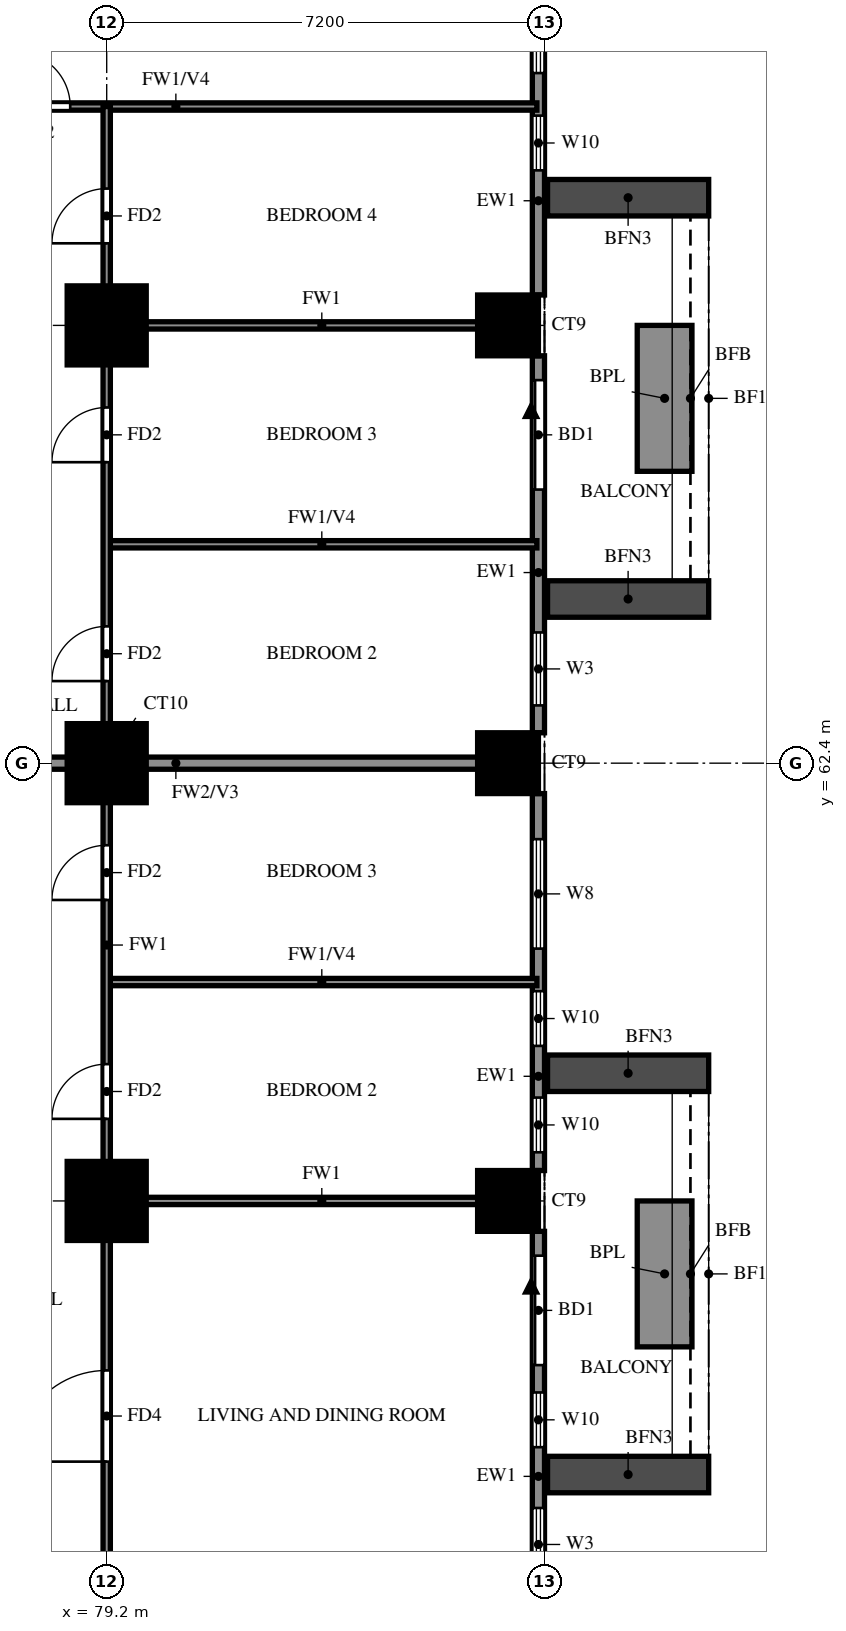
"""IFC4 building model, lengths in metres.
Left out: names, types, materials, properties, quantities, classifications, styles, units other than length and angle.
Written with IfcOpenShell. Run it as: python <this file> out.ifc"""

import sys

from ifc_helpers import new_model, si_unit, direction, frame, frame_2d, origin, origin_2d, place, context, subcontext, project, spatial, rectangle, extrude, source, transform, mapped, element, fill, save


model = new_model("IFC4")
c1 = context("Model", 3, precision=1e-05, world=origin(), true_north=direction((0.0, 1.0)))
c2 = subcontext(c1, "Body", "Model", "MODEL_VIEW")
j1 = project(units=[si_unit("LENGTHUNIT", "METRE"), si_unit("PLANEANGLEUNIT", "RADIAN")], contexts=[c1])
p1 = place(None, origin())
s1 = spatial("IfcSite", under=j1, at=p1, CompositionType="ELEMENT")
p2 = place(p1, origin())
s2 = spatial("IfcBuilding", under=s1, at=p2, CompositionType="ELEMENT")
p3 = place(p2, frame((0.0, 0.0, 72.5)))
s3 = spatial("IfcBuildingStorey", under=s2, at=p3, CompositionType="ELEMENT", Elevation=72.5)
m1 = source(origin(), c2, "Body", "SweptSolid", [
    extrude(rectangle(XDim=1.3, YDim=1.3, at=origin_2d()), origin(), (0.0, 0.0, 1.0), 3.18),
])
p4 = place(p3, frame((79.2, 55.2, 0.0), z_axis=(0.0, 0.0, 1.0), x_axis=(1.0, 0.0, 0.0)))
e1 = element("IfcColumn", 1, at=p4, inside=s3, PredefinedType="COLUMN", context=c2, shape_type="MappedRepresentation", body=[
    mapped(m1, transform((0.0, 0.0, 0.0))),
])
m2 = source(origin(), c2, "Body", "SweptSolid", [
    extrude(rectangle(XDim=1.0, YDim=1.0, at=origin_2d()), origin(), (0.0, 0.0, 1.0), 3.18),
])
p5 = place(p3, frame((85.8, 55.2, 0.0), z_axis=(0.0, 0.0, 1.0), x_axis=(1.0, 0.0, 0.0)))
e2 = element("IfcColumn", 2, at=p5, inside=s3, PredefinedType="COLUMN", context=c2, shape_type="MappedRepresentation", body=[
    mapped(m2, transform((0.0, 0.0, 0.0))),
])
p6 = place(p3, frame((79.2, 62.4, 0.0), z_axis=(0.0, 0.0, 1.0), x_axis=(1.0, 0.0, 0.0)))
e3 = element("IfcColumn", 3, at=p6, inside=s3, PredefinedType="COLUMN", context=c2, shape_type="MappedRepresentation", body=[
    mapped(m1, transform((0.0, 0.0, 0.0))),
])
p7 = place(p3, frame((85.8, 62.4, 0.0), z_axis=(0.0, 0.0, 1.0), x_axis=(1.0, 0.0, 0.0)))
e4 = element("IfcColumn", 4, at=p7, inside=s3, PredefinedType="COLUMN", context=c2, shape_type="MappedRepresentation", body=[
    mapped(m2, transform((0.0, 0.0, 0.0))),
])
p8 = place(p3, frame((79.2, 69.6, 0.0), z_axis=(0.0, 0.0, 1.0), x_axis=(1.0, 0.0, 0.0)))
e5 = element("IfcColumn", 5, at=p8, inside=s3, PredefinedType="COLUMN", context=c2, shape_type="MappedRepresentation", body=[
    mapped(m1, transform((0.0, 0.0, 0.0))),
])
p9 = place(p3, frame((85.8, 69.6, 0.0), z_axis=(0.0, 0.0, 1.0), x_axis=(1.0, 0.0, 0.0)))
e6 = element("IfcColumn", 6, at=p9, inside=s3, PredefinedType="COLUMN", context=c2, shape_type="MappedRepresentation", body=[
    mapped(m2, transform((0.0, 0.0, 0.0))),
])
p10 = place(p3, frame((86.3, 48.5, 0.0), z_axis=(0.0, 0.0, 1.0), x_axis=(0.0, 1.0, 0.0)))
e7 = element("IfcWall", 7, at=p10, inside=s3, PredefinedType="SOLIDWALL", context=c2, shape_type="SweptSolid", body=[
    extrude(rectangle(XDim=6.2, YDim=0.2, at=frame_2d((3.1, 0.0))), origin(), (0.0, 0.0, 1.0), 3.18),
])
p11 = place(p10, frame((4.0, 0.0, 0.0)))
e8 = element("IfcOpeningElement", 8, at=p11, cuts=e7, PredefinedType="OPENING", context=c2, shape_type="SweptSolid", body=[
    extrude(rectangle(XDim=1.8, YDim=2.4, at=frame_2d((0.9, 1.2))), frame((0.0, 0.11, 0.0), z_axis=(0.0, -1.0, 0.0), x_axis=(1.0, 0.0, 0.0)), (0.0, 0.0, 1.0), 0.22),
])
p12 = place(p10, frame((0.45, 0.0, 0.6)))
e9 = element("IfcOpeningElement", 9, at=p12, cuts=e7, PredefinedType="OPENING", context=c2, shape_type="SweptSolid", body=[
    extrude(rectangle(XDim=1.2, YDim=2.4, at=frame_2d((0.6, 1.2))), frame((0.0, 0.11, 0.0), z_axis=(0.0, -1.0, 0.0), x_axis=(1.0, 0.0, 0.0)), (0.0, 0.0, 1.0), 0.22),
])
p13 = place(p10, frame((2.65, 0.0, 0.6)))
e10 = element("IfcOpeningElement", 10, at=p13, cuts=e7, PredefinedType="OPENING", context=c2, shape_type="SweptSolid", body=[
    extrude(rectangle(XDim=0.9, YDim=2.4, at=frame_2d((0.45, 1.2))), frame((0.0, 0.11, 0.0), z_axis=(0.0, -1.0, 0.0), x_axis=(1.0, 0.0, 0.0)), (0.0, 0.0, 1.0), 0.22),
])
p14 = place(p3, frame((86.3, 55.7, 0.0), z_axis=(0.0, 0.0, 1.0), x_axis=(0.0, 1.0, 0.0)))
e11 = element("IfcWall", 11, at=p14, inside=s3, PredefinedType="SOLIDWALL", context=c2, shape_type="SweptSolid", body=[
    extrude(rectangle(XDim=6.2, YDim=0.2, at=frame_2d((3.1, 0.0))), origin(), (0.0, 0.0, 1.0), 3.18),
])
p15 = place(p14, frame((0.3, 0.0, 0.6)))
e12 = element("IfcOpeningElement", 12, at=p15, cuts=e11, PredefinedType="OPENING", context=c2, shape_type="SweptSolid", body=[
    extrude(rectangle(XDim=0.9, YDim=2.4, at=frame_2d((0.45, 1.2))), frame((0.0, 0.11, 0.0), z_axis=(0.0, -1.0, 0.0), x_axis=(1.0, 0.0, 0.0)), (0.0, 0.0, 1.0), 0.22),
])
p16 = place(p14, frame((2.05, 0.0, 0.6)))
e13 = element("IfcOpeningElement", 13, at=p16, cuts=e11, PredefinedType="OPENING", context=c2, shape_type="SweptSolid", body=[
    extrude(rectangle(XDim=0.9, YDim=2.4, at=frame_2d((0.45, 1.2))), frame((0.0, 0.11, 0.0), z_axis=(0.0, -1.0, 0.0), x_axis=(1.0, 0.0, 0.0)), (0.0, 0.0, 1.0), 0.22),
])
p17 = place(p14, frame((3.65, 0.0, 0.6)))
e14 = element("IfcOpeningElement", 14, at=p17, cuts=e11, PredefinedType="OPENING", context=c2, shape_type="SweptSolid", body=[
    extrude(rectangle(XDim=1.8, YDim=2.4, at=frame_2d((0.9, 1.2))), frame((0.0, 0.11, 0.0), z_axis=(0.0, -1.0, 0.0), x_axis=(1.0, 0.0, 0.0)), (0.0, 0.0, 1.0), 0.22),
])
p18 = place(p3, frame((86.3, 62.9, 0.0), z_axis=(0.0, 0.0, 1.0), x_axis=(0.0, 1.0, 0.0)))
e15 = element("IfcWall", 15, at=p18, inside=s3, PredefinedType="SOLIDWALL", context=c2, shape_type="SweptSolid", body=[
    extrude(rectangle(XDim=6.2, YDim=0.2, at=frame_2d((3.1, 0.0))), origin(), (0.0, 0.0, 1.0), 3.18),
])
p19 = place(p18, frame((4.0, 0.0, 0.0)))
e16 = element("IfcOpeningElement", 16, at=p19, cuts=e15, PredefinedType="OPENING", context=c2, shape_type="SweptSolid", body=[
    extrude(rectangle(XDim=1.8, YDim=2.4, at=frame_2d((0.9, 1.2))), frame((0.0, 0.11, 0.0), z_axis=(0.0, -1.0, 0.0), x_axis=(1.0, 0.0, 0.0)), (0.0, 0.0, 1.0), 0.22),
])
p20 = place(p18, frame((0.45, 0.0, 0.6)))
e17 = element("IfcOpeningElement", 17, at=p20, cuts=e15, PredefinedType="OPENING", context=c2, shape_type="SweptSolid", body=[
    extrude(rectangle(XDim=1.2, YDim=2.4, at=frame_2d((0.6, 1.2))), frame((0.0, 0.11, 0.0), z_axis=(0.0, -1.0, 0.0), x_axis=(1.0, 0.0, 0.0)), (0.0, 0.0, 1.0), 0.22),
])
p21 = place(p3, frame((86.3, 70.1, 0.0), z_axis=(0.0, 0.0, 1.0), x_axis=(0.0, 1.0, 0.0)))
e18 = element("IfcWall", 18, at=p21, inside=s3, PredefinedType="SOLIDWALL", context=c2, shape_type="SweptSolid", body=[
    extrude(rectangle(XDim=6.2, YDim=0.2, at=frame_2d((3.1, 0.0))), origin(), (0.0, 0.0, 1.0), 3.18),
])
p22 = place(p21, frame((2.05, 0.0, 0.6)))
e19 = element("IfcOpeningElement", 19, at=p22, cuts=e18, PredefinedType="OPENING", context=c2, shape_type="SweptSolid", body=[
    extrude(rectangle(XDim=0.9, YDim=2.4, at=frame_2d((0.45, 1.2))), frame((0.0, 0.11, 0.0), z_axis=(0.0, -1.0, 0.0), x_axis=(1.0, 0.0, 0.0)), (0.0, 0.0, 1.0), 0.22),
])
p23 = place(p21, frame((3.65, 0.0, 0.6)))
e20 = element("IfcOpeningElement", 20, at=p23, cuts=e18, PredefinedType="OPENING", context=c2, shape_type="SweptSolid", body=[
    extrude(rectangle(XDim=1.8, YDim=2.4, at=frame_2d((0.9, 1.2))), frame((0.0, 0.11, 0.0), z_axis=(0.0, -1.0, 0.0), x_axis=(1.0, 0.0, 0.0)), (0.0, 0.0, 1.0), 0.22),
])
for number, where, z_axis, x_axis in (
    (21, (86.45, 50.7, 0.0), (0.0, 0.0, 1.0), (1.0, 0.0, 0.0)),
    (22, (86.45, 57.3, 0.0), (0.0, 0.0, 1.0), (1.0, 0.0, 0.0)),
):
    element("IfcWall", number, at=place(p3, frame(where, z_axis=z_axis, x_axis=x_axis)), inside=s3, PredefinedType="SOLIDWALL", context=c2, shape_type="SweptSolid", body=[
        extrude(rectangle(XDim=2.65, YDim=0.6, at=frame_2d((1.325, 0.0))), origin(), (0.0, 0.0, 1.0), 2.85),
    ])
p24 = place(p3, frame((88.375, 52.8, 0.0), z_axis=(0.0, 0.0, 1.0), x_axis=(0.0, 1.0, 0.0)))
e23 = element("IfcWall", 23, at=p24, inside=s3, PredefinedType="SOLIDWALL", context=c2, shape_type="SweptSolid", body=[
    extrude(rectangle(XDim=2.4, YDim=0.9, at=frame_2d((1.2, 0.0))), origin(), (0.0, 0.0, 1.0), 0.9),
])
for number, where, z_axis, x_axis in (
    (24, (86.45, 65.1, 0.0), (0.0, 0.0, 1.0), (1.0, 0.0, 0.0)),
    (25, (86.45, 71.7, 0.0), (0.0, 0.0, 1.0), (1.0, 0.0, 0.0)),
):
    element("IfcWall", number, at=place(p3, frame(where, z_axis=z_axis, x_axis=x_axis)), inside=s3, PredefinedType="SOLIDWALL", context=c2, shape_type="SweptSolid", body=[
        extrude(rectangle(XDim=2.65, YDim=0.6, at=frame_2d((1.325, 0.0))), origin(), (0.0, 0.0, 1.0), 2.85),
    ])
p25 = place(p3, frame((88.375, 67.2, 0.0), z_axis=(0.0, 0.0, 1.0), x_axis=(0.0, 1.0, 0.0)))
e26 = element("IfcWall", 26, at=p25, inside=s3, PredefinedType="SOLIDWALL", context=c2, shape_type="SweptSolid", body=[
    extrude(rectangle(XDim=2.4, YDim=0.9, at=frame_2d((1.2, 0.0))), origin(), (0.0, 0.0, 1.0), 0.9),
])
p26 = place(p3, frame((74.4, 62.4, 0.0), z_axis=(0.0, 0.0, 1.0), x_axis=(1.0, 0.0, 0.0)))
e27 = element("IfcWall", 27, at=p26, inside=s3, PredefinedType="SOLIDWALL", context=c2, shape_type="SweptSolid", body=[
    extrude(rectangle(XDim=11.875, YDim=0.2, at=frame_2d((5.938, 0.0))), origin(), (0.0, 0.0, 1.0), 3.18),
])
p27 = place(p3, frame((79.2, 55.2, 0.0), z_axis=(0.0, 0.0, 1.0), x_axis=(1.0, 0.0, 0.0)))
e28 = element("IfcWall", 28, at=p27, inside=s3, PredefinedType="PARTITIONING", context=c2, shape_type="SweptSolid", body=[
    extrude(rectangle(XDim=7.075, YDim=0.12, at=frame_2d((3.538, 0.0))), origin(), (0.0, 0.0, 1.0), 3.18),
])
for number, where, z_axis, x_axis in (
    (29, (79.2, 58.8, 0.0), (0.0, 0.0, 1.0), (1.0, 0.0, 0.0)),
    (30, (79.2, 66.0, 0.0), (0.0, 0.0, 1.0), (1.0, 0.0, 0.0)),
):
    element("IfcWall", number, at=place(p3, frame(where, z_axis=z_axis, x_axis=x_axis)), inside=s3, PredefinedType="PARTITIONING", context=c2, shape_type="SweptSolid", body=[
        extrude(rectangle(XDim=7.075, YDim=0.12, at=frame_2d((3.538, 0.0))), origin(), (0.0, 0.0, 1.0), 2.28),
    ])
p28 = place(p3, frame((79.2, 69.6, 0.0), z_axis=(0.0, 0.0, 1.0), x_axis=(1.0, 0.0, 0.0)))
e31 = element("IfcWall", 31, at=p28, inside=s3, PredefinedType="PARTITIONING", context=c2, shape_type="SweptSolid", body=[
    extrude(rectangle(XDim=7.075, YDim=0.12, at=frame_2d((3.538, 0.0))), origin(), (0.0, 0.0, 1.0), 3.18),
])
p29 = place(p3, frame((74.4, 73.2, 0.0), z_axis=(0.0, 0.0, 1.0), x_axis=(1.0, 0.0, 0.0)))
e32 = element("IfcWall", 32, at=p29, inside=s3, PredefinedType="PARTITIONING", context=c2, shape_type="SweptSolid", body=[
    extrude(rectangle(XDim=11.875, YDim=0.12, at=frame_2d((5.938, 0.0))), origin(), (0.0, 0.0, 1.0), 2.28),
])
p30 = place(p29, frame((3.3, 0.0, 0.0)))
e33 = element("IfcOpeningElement", 33, at=p30, cuts=e32, PredefinedType="OPENING", context=c2, shape_type="SweptSolid", body=[
    extrude(rectangle(XDim=0.9, YDim=2.1, at=frame_2d((0.45, 1.05))), frame((0.0, 0.07, 0.0), z_axis=(0.0, -1.0, 0.0), x_axis=(1.0, 0.0, 0.0)), (0.0, 0.0, 1.0), 0.14),
])
p31 = place(p3, frame((79.2, 48.125, 0.0), z_axis=(0.0, 0.0, 1.0), x_axis=(0.0, 1.0, 0.0)))
e34 = element("IfcWall", 34, at=p31, inside=s3, PredefinedType="PARTITIONING", context=c2, shape_type="SweptSolid", body=[
    extrude(rectangle(XDim=25.075, YDim=0.12, at=frame_2d((12.538, 0.0))), origin(), (0.0, 0.0, 1.0), 3.18),
])
p32 = place(p31, frame((2.788, 0.0, 0.0)))
e35 = element("IfcOpeningElement", 35, at=p32, cuts=e34, PredefinedType="OPENING", context=c2, shape_type="SweptSolid", body=[
    extrude(rectangle(XDim=1.5, YDim=2.1, at=frame_2d((0.75, 1.05))), frame((0.0, 0.07, 0.0), z_axis=(0.0, -1.0, 0.0), x_axis=(1.0, 0.0, 0.0)), (0.0, 0.0, 1.0), 0.14),
])
p33 = place(p31, frame((8.425, 0.0, 0.0)))
e36 = element("IfcOpeningElement", 36, at=p33, cuts=e34, PredefinedType="OPENING", context=c2, shape_type="SweptSolid", body=[
    extrude(rectangle(XDim=0.9, YDim=2.1, at=frame_2d((0.45, 1.05))), frame((0.0, 0.07, 0.0), z_axis=(0.0, -1.0, 0.0), x_axis=(1.0, 0.0, 0.0)), (0.0, 0.0, 1.0), 0.14),
])
p34 = place(p31, frame((12.025, 0.0, 0.0)))
e37 = element("IfcOpeningElement", 37, at=p34, cuts=e34, PredefinedType="OPENING", context=c2, shape_type="SweptSolid", body=[
    extrude(rectangle(XDim=0.9, YDim=2.1, at=frame_2d((0.45, 1.05))), frame((0.0, 0.07, 0.0), z_axis=(0.0, -1.0, 0.0), x_axis=(1.0, 0.0, 0.0)), (0.0, 0.0, 1.0), 0.14),
])
p35 = place(p31, frame((15.625, 0.0, 0.0)))
e38 = element("IfcOpeningElement", 38, at=p35, cuts=e34, PredefinedType="OPENING", context=c2, shape_type="SweptSolid", body=[
    extrude(rectangle(XDim=0.9, YDim=2.1, at=frame_2d((0.45, 1.05))), frame((0.0, 0.07, 0.0), z_axis=(0.0, -1.0, 0.0), x_axis=(1.0, 0.0, 0.0)), (0.0, 0.0, 1.0), 0.14),
])
p36 = place(p31, frame((19.225, 0.0, 0.0)))
e39 = element("IfcOpeningElement", 39, at=p36, cuts=e34, PredefinedType="OPENING", context=c2, shape_type="SweptSolid", body=[
    extrude(rectangle(XDim=0.9, YDim=2.1, at=frame_2d((0.45, 1.05))), frame((0.0, 0.07, 0.0), z_axis=(0.0, -1.0, 0.0), x_axis=(1.0, 0.0, 0.0)), (0.0, 0.0, 1.0), 0.14),
])
p37 = place(p31, frame((22.825, 0.0, 0.0)))
e40 = element("IfcOpeningElement", 40, at=p37, cuts=e34, PredefinedType="OPENING", context=c2, shape_type="SweptSolid", body=[
    extrude(rectangle(XDim=0.9, YDim=2.1, at=frame_2d((0.45, 1.05))), frame((0.0, 0.07, 0.0), z_axis=(0.0, -1.0, 0.0), x_axis=(1.0, 0.0, 0.0)), (0.0, 0.0, 1.0), 0.14),
])
p38 = place(p11, origin())
e41 = element("IfcDoor", 41, at=p38, inside=s3, OperationType="DOUBLE_DOOR_SLIDING", PredefinedType="DOOR", context=c2, shape_type="SweptSolid", body=[
    extrude(rectangle(XDim=1.8, YDim=2.4, at=frame_2d((0.9, 1.2))), frame((0.0, 0.025, 0.0), z_axis=(0.0, -1.0, 0.0), x_axis=(1.0, 0.0, 0.0)), (0.0, 0.0, 1.0), 0.05),
])
fill(e8, e41)
p39 = place(p12, origin())
e42 = element("IfcWindow", 42, at=p39, inside=s3, PartitioningType="SINGLE_PANEL", PredefinedType="WINDOW", context=c2, shape_type="SweptSolid", body=[
    extrude(rectangle(XDim=1.2, YDim=2.4, at=frame_2d((0.6, 1.2))), frame((0.0, 0.03, 0.0), z_axis=(0.0, -1.0, 0.0), x_axis=(1.0, 0.0, 0.0)), (0.0, 0.0, 1.0), 0.06),
])
fill(e9, e42)
p40 = place(p13, origin())
e43 = element("IfcWindow", 43, at=p40, inside=s3, PartitioningType="SINGLE_PANEL", PredefinedType="WINDOW", context=c2, shape_type="SweptSolid", body=[
    extrude(rectangle(XDim=0.9, YDim=2.4, at=frame_2d((0.45, 1.2))), frame((0.0, 0.03, 0.0), z_axis=(0.0, -1.0, 0.0), x_axis=(1.0, 0.0, 0.0)), (0.0, 0.0, 1.0), 0.06),
])
fill(e10, e43)
p41 = place(p15, origin())
e44 = element("IfcWindow", 44, at=p41, inside=s3, PartitioningType="SINGLE_PANEL", PredefinedType="WINDOW", context=c2, shape_type="SweptSolid", body=[
    extrude(rectangle(XDim=0.9, YDim=2.4, at=frame_2d((0.45, 1.2))), frame((0.0, 0.03, 0.0), z_axis=(0.0, -1.0, 0.0), x_axis=(1.0, 0.0, 0.0)), (0.0, 0.0, 1.0), 0.06),
])
fill(e12, e44)
p42 = place(p16, origin())
e45 = element("IfcWindow", 45, at=p42, inside=s3, PartitioningType="SINGLE_PANEL", PredefinedType="WINDOW", context=c2, shape_type="SweptSolid", body=[
    extrude(rectangle(XDim=0.9, YDim=2.4, at=frame_2d((0.45, 1.2))), frame((0.0, 0.03, 0.0), z_axis=(0.0, -1.0, 0.0), x_axis=(1.0, 0.0, 0.0)), (0.0, 0.0, 1.0), 0.06),
])
fill(e13, e45)
p43 = place(p17, origin())
e46 = element("IfcWindow", 46, at=p43, inside=s3, PartitioningType="DOUBLE_PANEL_VERTICAL", PredefinedType="WINDOW", context=c2, shape_type="SweptSolid", body=[
    extrude(rectangle(XDim=1.8, YDim=2.4, at=frame_2d((0.9, 1.2))), frame((0.0, 0.03, 0.0), z_axis=(0.0, -1.0, 0.0), x_axis=(1.0, 0.0, 0.0)), (0.0, 0.0, 1.0), 0.06),
])
fill(e14, e46)
p44 = place(p19, origin())
e47 = element("IfcDoor", 47, at=p44, inside=s3, OperationType="DOUBLE_DOOR_SLIDING", PredefinedType="DOOR", context=c2, shape_type="SweptSolid", body=[
    extrude(rectangle(XDim=1.8, YDim=2.4, at=frame_2d((0.9, 1.2))), frame((0.0, 0.025, 0.0), z_axis=(0.0, -1.0, 0.0), x_axis=(1.0, 0.0, 0.0)), (0.0, 0.0, 1.0), 0.05),
])
fill(e16, e47)
p45 = place(p20, origin())
e48 = element("IfcWindow", 48, at=p45, inside=s3, PartitioningType="SINGLE_PANEL", PredefinedType="WINDOW", context=c2, shape_type="SweptSolid", body=[
    extrude(rectangle(XDim=1.2, YDim=2.4, at=frame_2d((0.6, 1.2))), frame((0.0, 0.03, 0.0), z_axis=(0.0, -1.0, 0.0), x_axis=(1.0, 0.0, 0.0)), (0.0, 0.0, 1.0), 0.06),
])
fill(e17, e48)
p46 = place(p22, origin())
e49 = element("IfcWindow", 49, at=p46, inside=s3, PartitioningType="SINGLE_PANEL", PredefinedType="WINDOW", context=c2, shape_type="SweptSolid", body=[
    extrude(rectangle(XDim=0.9, YDim=2.4, at=frame_2d((0.45, 1.2))), frame((0.0, 0.03, 0.0), z_axis=(0.0, -1.0, 0.0), x_axis=(1.0, 0.0, 0.0)), (0.0, 0.0, 1.0), 0.06),
])
fill(e19, e49)
p47 = place(p23, origin())
e50 = element("IfcWindow", 50, at=p47, inside=s3, PartitioningType="DOUBLE_PANEL_VERTICAL", PredefinedType="WINDOW", context=c2, shape_type="SweptSolid", body=[
    extrude(rectangle(XDim=1.8, YDim=2.4, at=frame_2d((0.9, 1.2))), frame((0.0, 0.03, 0.0), z_axis=(0.0, -1.0, 0.0), x_axis=(1.0, 0.0, 0.0)), (0.0, 0.0, 1.0), 0.06),
])
fill(e20, e50)
p48 = place(p32, origin())
e51 = element("IfcDoor", 51, at=p48, inside=s3, OperationType="SINGLE_SWING_RIGHT", PredefinedType="DOOR", context=c2, shape_type="SweptSolid", body=[
    extrude(rectangle(XDim=1.5, YDim=2.1, at=frame_2d((0.75, 1.05))), frame((0.0, 0.025, 0.0), z_axis=(0.0, -1.0, 0.0), x_axis=(1.0, 0.0, 0.0)), (0.0, 0.0, 1.0), 0.05),
])
fill(e35, e51)
p49 = place(p33, origin())
e52 = element("IfcDoor", 52, at=p49, inside=s3, OperationType="SINGLE_SWING_LEFT", PredefinedType="DOOR", context=c2, shape_type="SweptSolid", body=[
    extrude(rectangle(XDim=0.9, YDim=2.1, at=frame_2d((0.45, 1.05))), frame((0.0, 0.025, 0.0), z_axis=(0.0, -1.0, 0.0), x_axis=(1.0, 0.0, 0.0)), (0.0, 0.0, 1.0), 0.05),
])
fill(e36, e52)
p50 = place(p34, origin())
e53 = element("IfcDoor", 53, at=p50, inside=s3, OperationType="SINGLE_SWING_LEFT", PredefinedType="DOOR", context=c2, shape_type="SweptSolid", body=[
    extrude(rectangle(XDim=0.9, YDim=2.1, at=frame_2d((0.45, 1.05))), frame((0.0, 0.025, 0.0), z_axis=(0.0, -1.0, 0.0), x_axis=(1.0, 0.0, 0.0)), (0.0, 0.0, 1.0), 0.05),
])
fill(e37, e53)
p51 = place(p35, origin())
e54 = element("IfcDoor", 54, at=p51, inside=s3, OperationType="SINGLE_SWING_RIGHT", PredefinedType="DOOR", context=c2, shape_type="SweptSolid", body=[
    extrude(rectangle(XDim=0.9, YDim=2.1, at=frame_2d((0.45, 1.05))), frame((0.0, 0.025, 0.0), z_axis=(0.0, -1.0, 0.0), x_axis=(1.0, 0.0, 0.0)), (0.0, 0.0, 1.0), 0.05),
])
fill(e38, e54)
p52 = place(p36, origin())
e55 = element("IfcDoor", 55, at=p52, inside=s3, OperationType="SINGLE_SWING_LEFT", PredefinedType="DOOR", context=c2, shape_type="SweptSolid", body=[
    extrude(rectangle(XDim=0.9, YDim=2.1, at=frame_2d((0.45, 1.05))), frame((0.0, 0.025, 0.0), z_axis=(0.0, -1.0, 0.0), x_axis=(1.0, 0.0, 0.0)), (0.0, 0.0, 1.0), 0.05),
])
fill(e39, e55)
p53 = place(p37, origin())
e56 = element("IfcDoor", 56, at=p53, inside=s3, OperationType="SINGLE_SWING_LEFT", PredefinedType="DOOR", context=c2, shape_type="SweptSolid", body=[
    extrude(rectangle(XDim=0.9, YDim=2.1, at=frame_2d((0.45, 1.05))), frame((0.0, 0.025, 0.0), z_axis=(0.0, -1.0, 0.0), x_axis=(1.0, 0.0, 0.0)), (0.0, 0.0, 1.0), 0.05),
])
fill(e40, e56)
p54 = place(p30, origin())
e57 = element("IfcDoor", 57, at=p54, inside=s3, OperationType="SINGLE_SWING_RIGHT", PredefinedType="DOOR", context=c2, shape_type="SweptSolid", body=[
    extrude(rectangle(XDim=0.9, YDim=2.1, at=frame_2d((0.45, 1.05))), frame((0.0, 0.025, 0.0), z_axis=(0.0, -1.0, 0.0), x_axis=(1.0, 0.0, 0.0)), (0.0, 0.0, 1.0), 0.05),
])
fill(e33, e57)
save(model, sys.argv[1])
